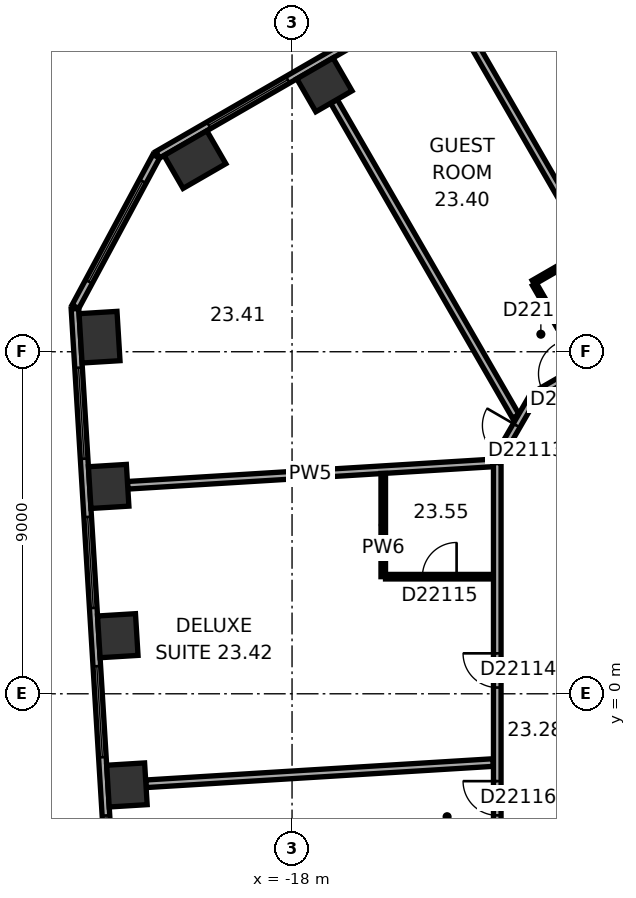
"""IFC4 building model, lengths in metres.
Left out: names, types, materials, properties, quantities, classifications, styles, units other than length and angle.
Written with IfcOpenShell. Run it as: python <this file> out.ifc"""

import sys

from ifc_helpers import new_model, si_unit, direction, frame, frame_2d, origin, origin_2d, place, context, subcontext, project, spatial, rectangle, extrude, element, fill, save


model = new_model("IFC4")
c1 = context("Model", 3, precision=1e-05, world=origin(), true_north=direction((0.0, 1.0)))
c2 = subcontext(c1, "Body", "Model", "MODEL_VIEW")
j1 = project(units=[si_unit("LENGTHUNIT", "METRE"), si_unit("PLANEANGLEUNIT", "RADIAN")], contexts=[c1])
p1 = place(None, origin())
s1 = spatial("IfcSite", under=j1, at=p1, CompositionType="ELEMENT")
p2 = place(p1, origin())
s2 = spatial("IfcBuilding", under=s1, at=p2, CompositionType="ELEMENT")
p3 = place(p2, frame((0.0, 0.0, 100.1)))
s3 = spatial("IfcBuildingStorey", under=s2, at=p3, CompositionType="ELEMENT", Elevation=100.1)
p4 = place(p3, frame((-17.148, 16.023, 0.0), z_axis=(0.0, 0.0, 1.0), x_axis=(-0.866025403784, -0.5, 0.0)))
e1 = element("IfcColumn", 1, at=p4, inside=s3, PredefinedType="COLUMN", context=c2, shape_type="SweptSolid", body=[
    extrude(rectangle(XDim=1.1, YDim=1.0, at=origin_2d()), origin(), (0.0, 0.0, 1.0), 3.3),
])
for number, where, z_axis, x_axis in (
    (2, (-20.555, 14.055, 0.0), (0.0, 0.0, 1.0), (-0.866, -0.5, 0.0)),
    (3, (-23.066, 9.383, 0.0), (0.0, 0.0, 1.0), (0.061, -0.998, 0.0)),
):
    element("IfcColumn", number, at=place(p3, frame(where, z_axis=z_axis, x_axis=x_axis)), inside=s3, PredefinedType="COLUMN", context=c2, shape_type="SweptSolid", body=[
        extrude(rectangle(XDim=1.3, YDim=1.0, at=origin_2d()), origin(), (0.0, 0.0, 1.0), 3.3),
    ])
for number, where, z_axis, x_axis in (
    (4, (-22.826, 5.456, 0.0), (0.0, 0.0, 1.0), (0.061, -0.998, 0.0)),
    (5, (-22.585, 1.529, 0.0), (0.0, 0.0, 1.0), (0.061, -0.998, 0.0)),
    (6, (-22.345, -2.399, 0.0), (0.0, 0.0, 1.0), (0.061, -0.998, 0.0)),
):
    element("IfcColumn", number, at=place(p3, frame(where, z_axis=z_axis, x_axis=x_axis)), inside=s3, PredefinedType="COLUMN", context=c2, shape_type="SweptSolid", body=[
        extrude(rectangle(XDim=1.1, YDim=1.0, at=origin_2d()), origin(), (0.0, 0.0, 1.0), 3.3),
    ])
p5 = place(p3, frame((-3.136, 24.805, 0.0), z_axis=(0.0, 0.0, 1.0), x_axis=(-0.866028291626, -0.499994998079, 0.0)))
e7 = element("IfcWall", 7, at=p5, inside=s3, PredefinedType="STANDARD", context=c2, shape_type="SweptSolid", body=[
    extrude(rectangle(XDim=21.246, YDim=0.2, at=frame_2d((10.623, 0.0))), origin(), (0.0, 0.0, 1.0), 3.3),
])
p6 = place(p5, frame((1.555, 0.0, 0.8)))
e8 = element("IfcOpeningElement", 8, at=p6, cuts=e7, PredefinedType="OPENING", context=c2, shape_type="SweptSolid", body=[
    extrude(rectangle(XDim=2.4, YDim=1.7, at=frame_2d((1.2, 0.85))), frame((0.0, 0.11, 0.0), z_axis=(0.0, -1.0, 0.0), x_axis=(1.0, 0.0, 0.0)), (0.0, 0.0, 1.0), 0.22),
])
p7 = place(p5, frame((5.489, 0.0, 0.8)))
e9 = element("IfcOpeningElement", 9, at=p7, cuts=e7, PredefinedType="OPENING", context=c2, shape_type="SweptSolid", body=[
    extrude(rectangle(XDim=2.4, YDim=1.7, at=frame_2d((1.2, 0.85))), frame((0.0, 0.11, 0.0), z_axis=(0.0, -1.0, 0.0), x_axis=(1.0, 0.0, 0.0)), (0.0, 0.0, 1.0), 0.22),
])
p8 = place(p5, frame((9.424, 0.0, 0.8)))
e10 = element("IfcOpeningElement", 10, at=p8, cuts=e7, PredefinedType="OPENING", context=c2, shape_type="SweptSolid", body=[
    extrude(rectangle(XDim=2.4, YDim=1.7, at=frame_2d((1.2, 0.85))), frame((0.0, 0.11, 0.0), z_axis=(0.0, -1.0, 0.0), x_axis=(1.0, 0.0, 0.0)), (0.0, 0.0, 1.0), 0.22),
])
p9 = place(p5, frame((13.358, 0.0, 0.8)))
e11 = element("IfcOpeningElement", 11, at=p9, cuts=e7, PredefinedType="OPENING", context=c2, shape_type="SweptSolid", body=[
    extrude(rectangle(XDim=2.4, YDim=1.7, at=frame_2d((1.2, 0.85))), frame((0.0, 0.11, 0.0), z_axis=(0.0, -1.0, 0.0), x_axis=(1.0, 0.0, 0.0)), (0.0, 0.0, 1.0), 0.22),
])
p10 = place(p5, frame((17.293, 0.0, 0.8)))
e12 = element("IfcOpeningElement", 12, at=p10, cuts=e7, PredefinedType="OPENING", context=c2, shape_type="SweptSolid", body=[
    extrude(rectangle(XDim=2.4, YDim=1.7, at=frame_2d((1.2, 0.85))), frame((0.0, 0.11, 0.0), z_axis=(0.0, -1.0, 0.0), x_axis=(1.0, 0.0, 0.0)), (0.0, 0.0, 1.0), 0.22),
])
p11 = place(p3, frame((-21.574, 14.143, 0.0), z_axis=(0.0, 0.0, 1.0), x_axis=(-0.473292949472, -0.880905093628, 0.0)))
e13 = element("IfcWall", 13, at=p11, inside=s3, PredefinedType="STANDARD", context=c2, shape_type="SweptSolid", body=[
    extrude(rectangle(XDim=4.494, YDim=0.2, at=frame_2d((2.247, 0.0))), origin(), (0.0, 0.0, 1.0), 3.3),
])
p12 = place(p11, frame((0.747, 0.0, 0.8)))
e14 = element("IfcOpeningElement", 14, at=p12, cuts=e13, PredefinedType="OPENING", context=c2, shape_type="SweptSolid", body=[
    extrude(rectangle(XDim=3.0, YDim=1.7, at=frame_2d((1.5, 0.85))), frame((0.0, 0.11, 0.0), z_axis=(0.0, -1.0, 0.0), x_axis=(1.0, 0.0, 0.0)), (0.0, 0.0, 1.0), 0.22),
])
p13 = place(p3, frame((-23.713, 10.131, 0.0), z_axis=(0.0, 0.0, 1.0), x_axis=(0.061040439785, -0.998135293791, 0.0)))
e15 = element("IfcWall", 15, at=p13, inside=s3, PredefinedType="STANDARD", context=c2, shape_type="SweptSolid", body=[
    extrude(rectangle(XDim=21.246, YDim=0.2, at=frame_2d((10.623, 0.0))), origin(), (0.0, 0.0, 1.0), 3.3),
])
p14 = place(p13, frame((1.553, 0.0, 0.8)))
e16 = element("IfcOpeningElement", 16, at=p14, cuts=e15, PredefinedType="OPENING", context=c2, shape_type="SweptSolid", body=[
    extrude(rectangle(XDim=2.4, YDim=1.7, at=frame_2d((1.2, 0.85))), frame((0.0, 0.11, 0.0), z_axis=(0.0, -1.0, 0.0), x_axis=(1.0, 0.0, 0.0)), (0.0, 0.0, 1.0), 0.22),
])
p15 = place(p13, frame((5.488, 0.0, 0.8)))
e17 = element("IfcOpeningElement", 17, at=p15, cuts=e15, PredefinedType="OPENING", context=c2, shape_type="SweptSolid", body=[
    extrude(rectangle(XDim=2.4, YDim=1.7, at=frame_2d((1.2, 0.85))), frame((0.0, 0.11, 0.0), z_axis=(0.0, -1.0, 0.0), x_axis=(1.0, 0.0, 0.0)), (0.0, 0.0, 1.0), 0.22),
])
p16 = place(p13, frame((9.422, 0.0, 0.8)))
e18 = element("IfcOpeningElement", 18, at=p16, cuts=e15, PredefinedType="OPENING", context=c2, shape_type="SweptSolid", body=[
    extrude(rectangle(XDim=2.4, YDim=1.7, at=frame_2d((1.2, 0.85))), frame((0.0, 0.11, 0.0), z_axis=(0.0, -1.0, 0.0), x_axis=(1.0, 0.0, 0.0)), (0.0, 0.0, 1.0), 0.22),
])
p17 = place(p13, frame((13.357, 0.0, 0.8)))
e19 = element("IfcOpeningElement", 19, at=p17, cuts=e15, PredefinedType="OPENING", context=c2, shape_type="SweptSolid", body=[
    extrude(rectangle(XDim=2.4, YDim=1.7, at=frame_2d((1.2, 0.85))), frame((0.0, 0.11, 0.0), z_axis=(0.0, -1.0, 0.0), x_axis=(1.0, 0.0, 0.0)), (0.0, 0.0, 1.0), 0.22),
])
p18 = place(p13, frame((17.292, 0.0, 0.8)))
e20 = element("IfcOpeningElement", 20, at=p18, cuts=e15, PredefinedType="OPENING", context=c2, shape_type="SweptSolid", body=[
    extrude(rectangle(XDim=2.4, YDim=1.7, at=frame_2d((1.2, 0.85))), frame((0.0, 0.11, 0.0), z_axis=(0.0, -1.0, 0.0), x_axis=(1.0, 0.0, 0.0)), (0.0, 0.0, 1.0), 0.22),
])
p19 = place(p3, frame((-22.327, 5.486, 0.0), z_axis=(0.0, 0.0, 1.0), x_axis=(0.998135194863, 0.061042057435, 0.0)))
e21 = element("IfcWall", 21, at=p19, inside=s3, PredefinedType="PARTITIONING", context=c2, shape_type="SweptSolid", body=[
    extrude(rectangle(XDim=9.635, YDim=0.2, at=frame_2d((4.817, 0.0))), origin(), (0.0, 0.0, 1.0), 3.05),
])
p20 = place(p3, frame((-21.846, -2.368, 0.0), z_axis=(0.0, 0.0, 1.0), x_axis=(0.998134617584, 0.061051496129, 0.0)))
e22 = element("IfcWall", 22, at=p20, inside=s3, PredefinedType="PARTITIONING", context=c2, shape_type="SweptSolid", body=[
    extrude(rectangle(XDim=9.154, YDim=0.2, at=frame_2d((4.577, 0.0))), origin(), (0.0, 0.0, 1.0), 3.05),
])
p21 = place(p3, frame((-16.898, 15.59, 0.0), z_axis=(0.0, 0.0, 1.0), x_axis=(0.500023458698, -0.866011859475, 0.0)))
e23 = element("IfcWall", 23, at=p21, inside=s3, PredefinedType="PARTITIONING", context=c2, shape_type="SweptSolid", body=[
    extrude(rectangle(XDim=9.572, YDim=0.2, at=frame_2d((4.786, 0.0))), origin(), (0.0, 0.0, 1.0), 3.05),
])
p22 = place(p3, frame((-15.6, 3.081, 0.0), z_axis=(0.0, 0.0, 1.0), x_axis=(0.0, 1.0, 0.0)))
e24 = element("IfcWall", 24, at=p22, inside=s3, PredefinedType="PARTITIONING", context=c2, shape_type="SweptSolid", body=[
    extrude(rectangle(XDim=2.716, YDim=0.12, at=frame_2d((1.358, 0.0))), origin(), (0.0, 0.0, 1.0), 3.05),
])
p23 = place(p3, frame((-12.7, 3.081, 0.0), z_axis=(0.0, 0.0, 1.0), x_axis=(-1.0, 0.0, 0.0)))
e25 = element("IfcWall", 25, at=p23, inside=s3, PredefinedType="PARTITIONING", context=c2, shape_type="SweptSolid", body=[
    extrude(rectangle(XDim=2.84, YDim=0.12, at=frame_2d((1.42, 0.0))), origin(), (0.0, 0.0, 1.0), 3.05),
])
p24 = place(p23, frame((0.97, 0.0, 0.0)))
e26 = element("IfcOpeningElement", 26, at=p24, cuts=e25, PredefinedType="OPENING", context=c2, shape_type="SweptSolid", body=[
    extrude(rectangle(XDim=0.9, YDim=2.1, at=frame_2d((0.45, 1.05))), frame((0.0, 0.07, 0.0), z_axis=(0.0, -1.0, 0.0), x_axis=(1.0, 0.0, 0.0)), (0.0, 0.0, 1.0), 0.14),
])
p25 = place(p3, frame((-12.6, 6.081, 0.0), z_axis=(0.0, 0.0, 1.0), x_axis=(0.0, -1.0, 0.0)))
e27 = element("IfcWall", 27, at=p25, inside=s3, PredefinedType="PARTITIONING", context=c2, shape_type="SweptSolid", body=[
    extrude(rectangle(XDim=12.219, YDim=0.2, at=frame_2d((6.109, 0.0))), origin(), (0.0, 0.0, 1.0), 3.05),
])
p26 = place(p25, frame((5.017, 0.0, 0.0)))
e28 = element("IfcOpeningElement", 28, at=p26, cuts=e27, PredefinedType="OPENING", context=c2, shape_type="SweptSolid", body=[
    extrude(rectangle(XDim=0.9, YDim=2.1, at=frame_2d((0.45, 1.05))), frame((0.0, 0.11, 0.0), z_axis=(0.0, -1.0, 0.0), x_axis=(1.0, 0.0, 0.0)), (0.0, 0.0, 1.0), 0.22),
])
p27 = place(p25, frame((8.38, 0.0, 0.0)))
e29 = element("IfcOpeningElement", 29, at=p27, cuts=e27, PredefinedType="OPENING", context=c2, shape_type="SweptSolid", body=[
    extrude(rectangle(XDim=0.9, YDim=2.1, at=frame_2d((0.45, 1.05))), frame((0.0, 0.11, 0.0), z_axis=(0.0, -1.0, 0.0), x_axis=(1.0, 0.0, 0.0)), (0.0, 0.0, 1.0), 0.22),
])
p28 = place(p3, frame((-11.65, 7.823, 0.0), z_axis=(0.0, 0.0, 1.0), x_axis=(-0.500063520245, -0.865988727248, 0.0)))
e30 = element("IfcWall", 30, at=p28, inside=s3, PredefinedType="PARTITIONING", context=c2, shape_type="SweptSolid", body=[
    extrude(rectangle(XDim=1.9, YDim=0.2, at=frame_2d((0.95, 0.0))), origin(), (0.0, 0.0, 1.0), 3.05),
])
p29 = place(p28, frame((0.882, 0.0, 0.0)))
e31 = element("IfcOpeningElement", 31, at=p29, cuts=e30, PredefinedType="OPENING", context=c2, shape_type="SweptSolid", body=[
    extrude(rectangle(XDim=0.9, YDim=2.1, at=frame_2d((0.45, 1.05))), frame((0.0, 0.11, 0.0), z_axis=(0.0, -1.0, 0.0), x_axis=(1.0, 0.0, 0.0)), (0.0, 0.0, 1.0), 0.22),
])
p30 = place(p3, frame((-11.651, 10.825, 0.0), z_axis=(0.0, 0.0, 1.0), x_axis=(0.865998477143, 0.500046635412, 0.0)))
e32 = element("IfcWall", 32, at=p30, inside=s3, PredefinedType="PARTITIONING", context=c2, shape_type="SweptSolid", body=[
    extrude(rectangle(XDim=1.673, YDim=0.12, at=frame_2d((0.836, 0.0))), origin(), (0.0, 0.0, 1.0), 3.05),
])
p31 = place(p3, frame((-10.401, 8.66, 0.0), z_axis=(0.0, 0.0, 1.0), x_axis=(-0.500077547548, 0.865980627057, 0.0)))
e33 = element("IfcWall", 33, at=p31, inside=s3, PredefinedType="PARTITIONING", context=c2, shape_type="SweptSolid", body=[
    extrude(rectangle(XDim=2.44, YDim=0.12, at=frame_2d((1.22, 0.0))), origin(), (0.0, 0.0, 1.0), 3.05),
])
p32 = place(p31, frame((0.77, 0.0, 0.0)))
e34 = element("IfcOpeningElement", 34, at=p32, cuts=e33, PredefinedType="OPENING", context=c2, shape_type="SweptSolid", body=[
    extrude(rectangle(XDim=0.9, YDim=2.1, at=frame_2d((0.45, 1.05))), frame((0.0, 0.07, 0.0), z_axis=(0.0, -1.0, 0.0), x_axis=(1.0, 0.0, 0.0)), (0.0, 0.0, 1.0), 0.14),
])
p33 = place(p3, frame((-8.902, 9.41, 0.0), z_axis=(0.0, 0.0, 1.0), x_axis=(-0.866014299198, -0.500019233215, 0.0)))
e35 = element("IfcWall", 35, at=p33, inside=s3, PredefinedType="PARTITIONING", context=c2, shape_type="SweptSolid", body=[
    extrude(rectangle(XDim=3.133, YDim=0.2, at=frame_2d((1.567, 0.0))), origin(), (0.0, 0.0, 1.0), 3.05),
])
p34 = place(p33, frame((1.978, 0.0, 0.0)))
e36 = element("IfcOpeningElement", 36, at=p34, cuts=e35, PredefinedType="OPENING", context=c2, shape_type="SweptSolid", body=[
    extrude(rectangle(XDim=0.9, YDim=2.1, at=frame_2d((0.45, 1.05))), frame((0.0, 0.11, 0.0), z_axis=(0.0, -1.0, 0.0), x_axis=(1.0, 0.0, 0.0)), (0.0, 0.0, 1.0), 0.22),
])
p35 = place(p3, frame((-7.865, 7.814, 0.0), z_axis=(0.0, 0.0, 1.0), x_axis=(-0.500004234368, 0.866022959057, 0.0)))
e37 = element("IfcWall", 37, at=p35, inside=s3, PredefinedType="PARTITIONING", context=c2, shape_type="SweptSolid", body=[
    extrude(rectangle(XDim=11.25, YDim=0.2, at=frame_2d((5.625, 0.0))), origin(), (0.0, 0.0, 1.0), 3.05),
])
p36 = place(p35, frame((0.5, 0.0, 0.0)))
e38 = element("IfcOpeningElement", 38, at=p36, cuts=e37, PredefinedType="OPENING", context=c2, shape_type="SweptSolid", body=[
    extrude(rectangle(XDim=0.9, YDim=2.1, at=frame_2d((0.45, 1.05))), frame((0.0, 0.11, 0.0), z_axis=(0.0, -1.0, 0.0), x_axis=(1.0, 0.0, 0.0)), (0.0, 0.0, 1.0), 0.22),
])
p37 = place(p10, origin())
e39 = element("IfcWindow", 39, at=p37, inside=s3, PartitioningType="SINGLE_PANEL", PredefinedType="WINDOW", context=c2, shape_type="SweptSolid", body=[
    extrude(rectangle(XDim=2.4, YDim=1.7, at=frame_2d((1.2, 0.85))), frame((0.0, 0.03, 0.0), z_axis=(0.0, -1.0, 0.0), x_axis=(1.0, 0.0, 0.0)), (0.0, 0.0, 1.0), 0.06),
])
fill(e12, e39)
p38 = place(p12, origin())
e40 = element("IfcWindow", 40, at=p38, inside=s3, PartitioningType="SINGLE_PANEL", PredefinedType="WINDOW", context=c2, shape_type="SweptSolid", body=[
    extrude(rectangle(XDim=3.0, YDim=1.7, at=frame_2d((1.5, 0.85))), frame((0.0, 0.03, 0.0), z_axis=(0.0, -1.0, 0.0), x_axis=(1.0, 0.0, 0.0)), (0.0, 0.0, 1.0), 0.06),
])
fill(e14, e40)
p39 = place(p14, origin())
e41 = element("IfcWindow", 41, at=p39, inside=s3, PartitioningType="SINGLE_PANEL", PredefinedType="WINDOW", context=c2, shape_type="SweptSolid", body=[
    extrude(rectangle(XDim=2.4, YDim=1.7, at=frame_2d((1.2, 0.85))), frame((0.0, 0.03, 0.0), z_axis=(0.0, -1.0, 0.0), x_axis=(1.0, 0.0, 0.0)), (0.0, 0.0, 1.0), 0.06),
])
fill(e16, e41)
p40 = place(p15, origin())
e42 = element("IfcWindow", 42, at=p40, inside=s3, PartitioningType="SINGLE_PANEL", PredefinedType="WINDOW", context=c2, shape_type="SweptSolid", body=[
    extrude(rectangle(XDim=2.4, YDim=1.7, at=frame_2d((1.2, 0.85))), frame((0.0, 0.03, 0.0), z_axis=(0.0, -1.0, 0.0), x_axis=(1.0, 0.0, 0.0)), (0.0, 0.0, 1.0), 0.06),
])
fill(e17, e42)
p41 = place(p16, origin())
e43 = element("IfcWindow", 43, at=p41, inside=s3, PartitioningType="SINGLE_PANEL", PredefinedType="WINDOW", context=c2, shape_type="SweptSolid", body=[
    extrude(rectangle(XDim=2.4, YDim=1.7, at=frame_2d((1.2, 0.85))), frame((0.0, 0.03, 0.0), z_axis=(0.0, -1.0, 0.0), x_axis=(1.0, 0.0, 0.0)), (0.0, 0.0, 1.0), 0.06),
])
fill(e18, e43)
p42 = place(p17, origin())
e44 = element("IfcWindow", 44, at=p42, inside=s3, PartitioningType="SINGLE_PANEL", PredefinedType="WINDOW", context=c2, shape_type="SweptSolid", body=[
    extrude(rectangle(XDim=2.4, YDim=1.7, at=frame_2d((1.2, 0.85))), frame((0.0, 0.03, 0.0), z_axis=(0.0, -1.0, 0.0), x_axis=(1.0, 0.0, 0.0)), (0.0, 0.0, 1.0), 0.06),
])
fill(e19, e44)
p43 = place(p34, origin())
e45 = element("IfcDoor", 45, at=p43, inside=s3, OperationType="SINGLE_SWING_LEFT", PredefinedType="DOOR", context=c2, shape_type="SweptSolid", body=[
    extrude(rectangle(XDim=0.9, YDim=2.1, at=frame_2d((0.45, 1.05))), frame((0.0, 0.025, 0.0), z_axis=(0.0, -1.0, 0.0), x_axis=(1.0, 0.0, 0.0)), (0.0, 0.0, 1.0), 0.05),
])
fill(e36, e45)
p44 = place(p32, origin())
e46 = element("IfcDoor", 46, at=p44, inside=s3, OperationType="SINGLE_SWING_LEFT", PredefinedType="DOOR", context=c2, shape_type="SweptSolid", body=[
    extrude(rectangle(XDim=0.9, YDim=2.1, at=frame_2d((0.45, 1.05))), frame((0.0, 0.025, 0.0), z_axis=(0.0, -1.0, 0.0), x_axis=(1.0, 0.0, 0.0)), (0.0, 0.0, 1.0), 0.05),
])
fill(e34, e46)
p45 = place(p29, origin())
e47 = element("IfcDoor", 47, at=p45, inside=s3, OperationType="SINGLE_SWING_LEFT", PredefinedType="DOOR", context=c2, shape_type="SweptSolid", body=[
    extrude(rectangle(XDim=0.9, YDim=2.1, at=frame_2d((0.45, 1.05))), frame((0.0, 0.025, 0.0), z_axis=(0.0, -1.0, 0.0), x_axis=(1.0, 0.0, 0.0)), (0.0, 0.0, 1.0), 0.05),
])
fill(e31, e47)
p46 = place(p26, origin())
e48 = element("IfcDoor", 48, at=p46, inside=s3, OperationType="SINGLE_SWING_LEFT", PredefinedType="DOOR", context=c2, shape_type="SweptSolid", body=[
    extrude(rectangle(XDim=0.9, YDim=2.1, at=frame_2d((0.45, 1.05))), frame((0.0, 0.025, 0.0), z_axis=(0.0, -1.0, 0.0), x_axis=(1.0, 0.0, 0.0)), (0.0, 0.0, 1.0), 0.05),
])
fill(e28, e48)
p47 = place(p24, origin())
e49 = element("IfcDoor", 49, at=p47, inside=s3, OperationType="SINGLE_SWING_LEFT", PredefinedType="DOOR", context=c2, shape_type="SweptSolid", body=[
    extrude(rectangle(XDim=0.9, YDim=2.1, at=frame_2d((0.45, 1.05))), frame((0.0, 0.025, 0.0), z_axis=(0.0, -1.0, 0.0), x_axis=(1.0, 0.0, 0.0)), (0.0, 0.0, 1.0), 0.05),
])
fill(e26, e49)
p48 = place(p27, origin())
e50 = element("IfcDoor", 50, at=p48, inside=s3, OperationType="SINGLE_SWING_LEFT", PredefinedType="DOOR", context=c2, shape_type="SweptSolid", body=[
    extrude(rectangle(XDim=0.9, YDim=2.1, at=frame_2d((0.45, 1.05))), frame((0.0, 0.025, 0.0), z_axis=(0.0, -1.0, 0.0), x_axis=(1.0, 0.0, 0.0)), (0.0, 0.0, 1.0), 0.05),
])
fill(e29, e50)
save(model, sys.argv[1])
